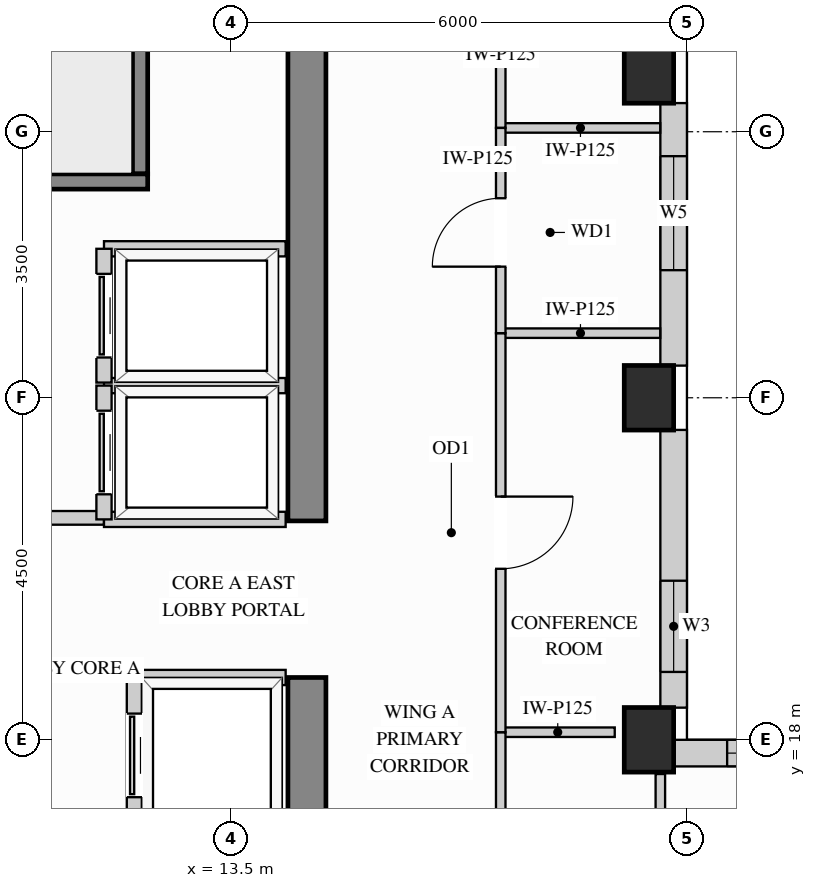
"""IFC4 building model, lengths in metres.
Left out: names, types, materials, properties, quantities, classifications, styles, units other than length and angle.
Written with IfcOpenShell. Run it as: python <this file> out.ifc"""

import sys

from ifc_helpers import new_model, si_unit, direction, frame, frame_2d, origin, origin_2d, place, context, subcontext, project, spatial, rectangle, extrude, source, transform, mapped, element, fill, save


model = new_model("IFC4")
c1 = context("Model", 3, precision=1e-05, world=origin(), true_north=direction((0.0, 1.0)))
c2 = subcontext(c1, "Body", "Model", "MODEL_VIEW")
j1 = project(units=[si_unit("LENGTHUNIT", "METRE"), si_unit("PLANEANGLEUNIT", "RADIAN")], contexts=[c1])
p1 = place(None, origin())
s1 = spatial("IfcSite", under=j1, at=p1, CompositionType="ELEMENT")
p2 = place(p1, origin())
s2 = spatial("IfcBuilding", under=s1, at=p2, CompositionType="ELEMENT")
p3 = place(p2, frame((0.0, 0.0, 216.0)))
s3 = spatial("IfcBuildingStorey", under=s2, at=p3, CompositionType="ELEMENT", Elevation=216.0)
m1 = source(origin(), c2, "Body", "SweptSolid", [
    extrude(rectangle(XDim=0.65, YDim=0.85, at=origin_2d()), origin(), (0.0, 0.0, 1.0), 3.4),
])
for number, where, z_axis, x_axis in (
    (1, (19.0, 18.0, 0.0), (0.0, 0.0, 1.0), (1.0, 0.0, 0.0)),
    (2, (19.0, 22.5, 0.0), (0.0, 0.0, 1.0), (1.0, 0.0, 0.0)),
    (3, (19.0, 26.8, 0.0), (0.0, 0.0, 1.0), (1.0, 0.0, 0.0)),
):
    element("IfcColumn", number, at=place(p3, frame(where, z_axis=z_axis, x_axis=x_axis)), inside=s3, PredefinedType="COLUMN", context=c2, shape_type="MappedRepresentation", body=[
        mapped(m1, transform((0.0, 0.0, 0.0), x_axis=(1.0, 0.0, 0.0), y_axis=(0.0, 1.0, 0.0), z_axis=(0.0, 0.0, 1.0))),
    ])
m2 = source(origin(), c2, "Body", "SweptSolid", [
    extrude(rectangle(XDim=10.07, YDim=0.5, at=frame_2d((5.035, 0.0))), origin(), (0.0, 0.0, 1.0), 3.4),
])
p4 = place(p3, frame((14.5, 8.75, 0.0), z_axis=(0.0, 0.0, 1.0), x_axis=(0.0, 1.0, 0.0)))
e4 = element("IfcWall", 4, at=p4, inside=s3, PredefinedType="SHEAR", context=c2, shape_type="MappedRepresentation", body=[
    mapped(m2, transform((0.0, 0.0, 0.0), x_axis=(1.0, 0.0, 0.0), y_axis=(0.0, 1.0, 0.0), z_axis=(0.0, 0.0, 1.0))),
])
m3 = source(origin(), c2, "Body", "SweptSolid", [
    extrude(rectangle(XDim=8.37, YDim=0.5, at=frame_2d((4.185, 0.0))), origin(), (0.0, 0.0, 1.0), 3.4),
])
p5 = place(p3, frame((14.5, 20.88, 0.0), z_axis=(0.0, 0.0, 1.0), x_axis=(0.0, 1.0, 0.0)))
e5 = element("IfcWall", 5, at=p5, inside=s3, PredefinedType="SHEAR", context=c2, shape_type="MappedRepresentation", body=[
    mapped(m3, transform((0.0, 0.0, 0.0), x_axis=(1.0, 0.0, 0.0), y_axis=(0.0, 1.0, 0.0), z_axis=(0.0, 0.0, 1.0))),
])
p6 = place(p3, frame((34.577, 17.825, 0.0), z_axis=(0.0, 0.0, 1.0), x_axis=(-1.0, 0.0, 0.0)))
e6 = element("IfcWall", 6, at=p6, inside=s3, PredefinedType="SOLIDWALL", context=c2, shape_type="SweptSolid", body=[
    extrude(rectangle(XDim=15.254, YDim=0.35, at=frame_2d((7.627, 0.0))), origin(), (0.0, 0.0, 1.0), 3.385),
])
p7 = place(p6, frame((0.706, 0.0, 0.78)))
e7 = element("IfcOpeningElement", 7, at=p7, cuts=e6, PredefinedType="OPENING", context=c2, shape_type="SweptSolid", body=[
    extrude(rectangle(XDim=1.5, YDim=2.0, at=frame_2d((0.75, 1.0))), frame((0.0, 0.185, 0.0), z_axis=(0.0, -1.0, 0.0), x_axis=(1.0, 0.0, 0.0)), (0.0, 0.0, 1.0), 0.37),
])
p8 = place(p6, frame((2.591, 0.0, 0.78)))
e8 = element("IfcOpeningElement", 8, at=p8, cuts=e6, PredefinedType="OPENING", context=c2, shape_type="SweptSolid", body=[
    extrude(rectangle(XDim=1.5, YDim=2.0, at=frame_2d((0.75, 1.0))), frame((0.0, 0.185, 0.0), z_axis=(0.0, -1.0, 0.0), x_axis=(1.0, 0.0, 0.0)), (0.0, 0.0, 1.0), 0.37),
])
p9 = place(p6, frame((5.744, 0.0, 0.78)))
e9 = element("IfcOpeningElement", 9, at=p9, cuts=e6, PredefinedType="OPENING", context=c2, shape_type="SweptSolid", body=[
    extrude(rectangle(XDim=1.5, YDim=2.0, at=frame_2d((0.75, 1.0))), frame((0.0, 0.185, 0.0), z_axis=(0.0, -1.0, 0.0), x_axis=(1.0, 0.0, 0.0)), (0.0, 0.0, 1.0), 0.37),
])
p10 = place(p6, frame((8.01, 0.0, 0.78)))
e10 = element("IfcOpeningElement", 10, at=p10, cuts=e6, PredefinedType="OPENING", context=c2, shape_type="SweptSolid", body=[
    extrude(rectangle(XDim=1.5, YDim=2.0, at=frame_2d((0.75, 1.0))), frame((0.0, 0.185, 0.0), z_axis=(0.0, -1.0, 0.0), x_axis=(1.0, 0.0, 0.0)), (0.0, 0.0, 1.0), 0.37),
])
p11 = place(p6, frame((11.163, 0.0, 0.78)))
e11 = element("IfcOpeningElement", 11, at=p11, cuts=e6, PredefinedType="OPENING", context=c2, shape_type="SweptSolid", body=[
    extrude(rectangle(XDim=1.5, YDim=2.0, at=frame_2d((0.75, 1.0))), frame((0.0, 0.185, 0.0), z_axis=(0.0, -1.0, 0.0), x_axis=(1.0, 0.0, 0.0)), (0.0, 0.0, 1.0), 0.37),
])
p12 = place(p6, frame((13.048, 0.0, 0.78)))
e12 = element("IfcOpeningElement", 12, at=p12, cuts=e6, PredefinedType="OPENING", context=c2, shape_type="SweptSolid", body=[
    extrude(rectangle(XDim=1.5, YDim=2.0, at=frame_2d((0.75, 1.0))), frame((0.0, 0.185, 0.0), z_axis=(0.0, -1.0, 0.0), x_axis=(1.0, 0.0, 0.0)), (0.0, 0.0, 1.0), 0.37),
])
p13 = place(p3, frame((19.325, 18.423, 0.0), z_axis=(0.0, 0.0, 1.0), x_axis=(0.0, 1.0, 0.0)))
e13 = element("IfcWall", 13, at=p13, inside=s3, PredefinedType="SOLIDWALL", context=c2, shape_type="SweptSolid", body=[
    extrude(rectangle(XDim=3.654, YDim=0.35, at=frame_2d((1.827, 0.0))), origin(), (0.0, 0.0, 1.0), 2.619),
])
p14 = place(p13, frame((0.47, 0.0, 0.78)))
e14 = element("IfcOpeningElement", 14, at=p14, cuts=e13, PredefinedType="OPENING", context=c2, shape_type="SweptSolid", body=[
    extrude(rectangle(XDim=1.2, YDim=1.659, at=frame_2d((0.6, 0.83))), frame((0.0, 0.185, 0.0), z_axis=(0.0, -1.0, 0.0), x_axis=(1.0, 0.0, 0.0)), (0.0, 0.0, 1.0), 0.37),
])
p15 = place(p3, frame((19.325, 22.923, 0.0), z_axis=(0.0, 0.0, 1.0), x_axis=(0.0, 1.0, 0.0)))
e15 = element("IfcWall", 15, at=p15, inside=s3, PredefinedType="SOLIDWALL", context=c2, shape_type="SweptSolid", body=[
    extrude(rectangle(XDim=3.454, YDim=0.35, at=frame_2d((1.727, 0.0))), origin(), (0.0, 0.0, 1.0), 2.619),
])
p16 = place(p15, frame((1.256, 0.0, 0.78)))
e16 = element("IfcOpeningElement", 16, at=p16, cuts=e15, PredefinedType="OPENING", context=c2, shape_type="SweptSolid", body=[
    extrude(rectangle(XDim=1.5, YDim=1.659, at=frame_2d((0.75, 0.83))), frame((0.0, 0.185, 0.0), z_axis=(0.0, -1.0, 0.0), x_axis=(1.0, 0.0, 0.0)), (0.0, 0.0, 1.0), 0.37),
])
p17 = place(p3, frame((7.15, 20.92, 0.0), z_axis=(0.0, 0.0, 1.0), x_axis=(1.0, 0.0, 0.0)))
e17 = element("IfcWall", 17, at=p17, inside=s3, PredefinedType="PARTITIONING", context=c2, shape_type="SweptSolid", body=[
    extrude(rectangle(XDim=4.68, YDim=0.18, at=frame_2d((2.34, 0.0))), origin(), (0.0, 0.0, 1.0), 3.385),
])
p18 = place(p17, frame((2.2, 0.0, 0.0)))
e18 = element("IfcOpeningElement", 18, at=p18, cuts=e17, PredefinedType="OPENING", context=c2, shape_type="SweptSolid", body=[
    extrude(rectangle(XDim=1.1, YDim=2.15, at=frame_2d((0.55, 1.075))), frame((0.0, 0.1, 0.0), z_axis=(0.0, -1.0, 0.0), x_axis=(1.0, 0.0, 0.0)), (0.0, 0.0, 1.0), 0.2),
])
m4 = source(origin(), c2, "Body", "SweptSolid", [
    extrude(rectangle(XDim=1.5, YDim=0.125, at=frame_2d((0.75, 0.0))), origin(), (0.0, 0.0, 1.0), 2.773),
])
p19 = place(p3, frame((17.05, 18.1, 0.0), z_axis=(0.0, 0.0, 1.0), x_axis=(1.0, 0.0, 0.0)))
e19 = element("IfcWall", 19, at=p19, inside=s3, PredefinedType="PARTITIONING", context=c2, shape_type="MappedRepresentation", body=[
    mapped(m4, transform((0.0, 0.0, 0.0), x_axis=(1.0, 0.0, 0.0), y_axis=(0.0, 1.0, 0.0), z_axis=(0.0, 0.0, 1.0))),
])
m5 = source(origin(), c2, "Body", "SweptSolid", [
    extrude(rectangle(XDim=2.098, YDim=0.125, at=frame_2d((1.049, 0.0))), origin(), (0.0, 0.0, 1.0), 3.385),
])
for number, where, z_axis, x_axis in (
    (20, (17.05, 23.35, 0.0), (0.0, 0.0, 1.0), (1.0, 0.0, 0.0)),
    (21, (17.05, 26.05, 0.0), (0.0, 0.0, 1.0), (1.0, 0.0, 0.0)),
):
    element("IfcWall", number, at=place(p3, frame(where, z_axis=z_axis, x_axis=x_axis)), inside=s3, PredefinedType="PARTITIONING", context=c2, shape_type="MappedRepresentation", body=[
        mapped(m5, transform((0.0, 0.0, 0.0), x_axis=(1.0, 0.0, 0.0), y_axis=(0.0, 1.0, 0.0), z_axis=(0.0, 0.0, 1.0))),
    ])
m6 = source(origin(), c2, "Body", "SweptSolid", [
    extrude(rectangle(XDim=3.6, YDim=0.125, at=frame_2d((1.8, 0.0))), origin(), (0.0, 0.0, 1.0), 2.773),
])
p20 = place(p3, frame((19.15, 13.95, 0.0), z_axis=(0.0, 0.0, 1.0), x_axis=(0.0, 1.0, 0.0)))
e22 = element("IfcWall", 22, at=p20, inside=s3, PredefinedType="PARTITIONING", context=c2, shape_type="MappedRepresentation", body=[
    mapped(m6, transform((0.0, 0.0, 0.0), x_axis=(1.0, 0.0, 0.0), y_axis=(0.0, 1.0, 0.0), z_axis=(0.0, 0.0, 1.0))),
])
p21 = place(p3, frame((17.05, 12.35, 0.0), z_axis=(0.0, 0.0, 1.0), x_axis=(0.0, 1.0, 0.0)))
e23 = element("IfcWall", 23, at=p21, inside=s3, PredefinedType="PARTITIONING", context=c2, shape_type="SweptSolid", body=[
    extrude(rectangle(XDim=5.75, YDim=0.125, at=frame_2d((2.875, 0.0))), origin(), (0.0, 0.0, 1.0), 3.385),
])
p22 = place(p21, frame((2.4, 0.0, 0.0)))
e24 = element("IfcOpeningElement", 24, at=p22, cuts=e23, PredefinedType="OPENING", context=c2, shape_type="SweptSolid", body=[
    extrude(rectangle(XDim=0.95, YDim=2.15, at=frame_2d((0.475, 1.075))), frame((0.0, 0.073, 0.0), z_axis=(0.0, -1.0, 0.0), x_axis=(1.0, 0.0, 0.0)), (0.0, 0.0, 1.0), 0.145),
])
p23 = place(p3, frame((17.05, 18.1, 0.0), z_axis=(0.0, 0.0, 1.0), x_axis=(0.0, 1.0, 0.0)))
e25 = element("IfcWall", 25, at=p23, inside=s3, PredefinedType="PARTITIONING", context=c2, shape_type="SweptSolid", body=[
    extrude(rectangle(XDim=5.25, YDim=0.125, at=frame_2d((2.625, 0.0))), origin(), (0.0, 0.0, 1.0), 3.385),
])
p24 = place(p23, frame((2.15, 0.0, 0.0)))
e26 = element("IfcOpeningElement", 26, at=p24, cuts=e25, PredefinedType="OPENING", context=c2, shape_type="SweptSolid", body=[
    extrude(rectangle(XDim=0.95, YDim=2.15, at=frame_2d((0.475, 1.075))), frame((0.0, 0.073, 0.0), z_axis=(0.0, -1.0, 0.0), x_axis=(1.0, 0.0, 0.0)), (0.0, 0.0, 1.0), 0.145),
])
p25 = place(p3, frame((17.05, 26.05, 0.0), z_axis=(0.0, 0.0, 1.0), x_axis=(0.0, 1.0, 0.0)))
e27 = element("IfcWall", 27, at=p25, inside=s3, PredefinedType="PARTITIONING", context=c2, shape_type="SweptSolid", body=[
    extrude(rectangle(XDim=6.2, YDim=0.125, at=frame_2d((3.1, 0.0))), origin(), (0.0, 0.0, 1.0), 3.385),
])
p26 = place(p25, frame((2.625, 0.0, 0.0)))
e28 = element("IfcOpeningElement", 28, at=p26, cuts=e27, PredefinedType="OPENING", context=c2, shape_type="SweptSolid", body=[
    extrude(rectangle(XDim=0.95, YDim=2.15, at=frame_2d((0.475, 1.075))), frame((0.0, 0.073, 0.0), z_axis=(0.0, -1.0, 0.0), x_axis=(1.0, 0.0, 0.0)), (0.0, 0.0, 1.0), 0.145),
])
p27 = place(p3, frame((17.05, 23.35, 0.0), z_axis=(0.0, 0.0, 1.0), x_axis=(0.0, 1.0, 0.0)))
e29 = element("IfcWall", 29, at=p27, inside=s3, PredefinedType="PARTITIONING", context=c2, shape_type="SweptSolid", body=[
    extrude(rectangle(XDim=2.7, YDim=0.125, at=frame_2d((1.35, 0.0))), origin(), (0.0, 0.0, 1.0), 3.385),
])
p28 = place(p27, frame((0.875, 0.0, 0.0)))
e30 = element("IfcOpeningElement", 30, at=p28, cuts=e29, PredefinedType="OPENING", context=c2, shape_type="SweptSolid", body=[
    extrude(rectangle(XDim=0.9, YDim=2.15, at=frame_2d((0.45, 1.075))), frame((0.0, 0.073, 0.0), z_axis=(0.0, -1.0, 0.0), x_axis=(1.0, 0.0, 0.0)), (0.0, 0.0, 1.0), 0.145),
])
m7 = source(origin(), c2, "Body", "SweptSolid", [
    extrude(rectangle(XDim=2.39, YDim=0.2, at=frame_2d((1.195, 0.0))), origin(), (0.0, 0.0, 1.0), 3.385),
])
for number, where, z_axis, x_axis in (
    (31, (11.83, 22.66, 0.0), (0.0, 0.0, 1.0), (1.0, 0.0, 0.0)),
    (32, (11.83, 20.9, 0.0), (0.0, 0.0, 1.0), (1.0, 0.0, 0.0)),
):
    element("IfcWall", number, at=place(p3, frame(where, z_axis=z_axis, x_axis=x_axis)), inside=s3, PredefinedType="PARTITIONING", context=c2, shape_type="MappedRepresentation", body=[
        mapped(m7, transform((0.0, 0.0, 0.0), x_axis=(1.0, 0.0, 0.0), y_axis=(0.0, 1.0, 0.0), z_axis=(0.0, 0.0, 1.0))),
    ])
p29 = place(p3, frame((11.83, 20.9, 0.0), z_axis=(0.0, 0.0, 1.0), x_axis=(0.0, 1.0, 0.0)))
e33 = element("IfcWall", 33, at=p29, inside=s3, PredefinedType="PARTITIONING", context=c2, shape_type="SweptSolid", body=[
    extrude(rectangle(XDim=1.76, YDim=0.2, at=frame_2d((0.88, 0.0))), origin(), (0.0, 0.0, 1.0), 3.385),
])
p30 = place(p29, frame((0.33, 0.0, 0.0)))
e34 = element("IfcOpeningElement", 34, at=p30, cuts=e33, PredefinedType="OPENING", context=c2, shape_type="SweptSolid", body=[
    extrude(rectangle(XDim=1.1, YDim=2.2, at=frame_2d((0.55, 1.1))), frame((0.0, 0.11, 0.0), z_axis=(0.0, -1.0, 0.0), x_axis=(1.0, 0.0, 0.0)), (0.0, 0.0, 1.0), 0.22),
])
p31 = place(p3, frame((11.83, 24.46, 0.0), z_axis=(0.0, 0.0, 1.0), x_axis=(1.0, 0.0, 0.0)))
e35 = element("IfcWall", 35, at=p31, inside=s3, PredefinedType="PARTITIONING", context=c2, shape_type="MappedRepresentation", body=[
    mapped(m7, transform((0.0, 0.0, 0.0), x_axis=(1.0, 0.0, 0.0), y_axis=(0.0, 1.0, 0.0), z_axis=(0.0, 0.0, 1.0))),
])
p32 = place(p3, frame((11.83, 22.7, 0.0), z_axis=(0.0, 0.0, 1.0), x_axis=(0.0, 1.0, 0.0)))
e36 = element("IfcWall", 36, at=p32, inside=s3, PredefinedType="PARTITIONING", context=c2, shape_type="SweptSolid", body=[
    extrude(rectangle(XDim=1.76, YDim=0.2, at=frame_2d((0.88, 0.0))), origin(), (0.0, 0.0, 1.0), 3.385),
])
p33 = place(p32, frame((0.33, 0.0, 0.0)))
e37 = element("IfcOpeningElement", 37, at=p33, cuts=e36, PredefinedType="OPENING", context=c2, shape_type="SweptSolid", body=[
    extrude(rectangle(XDim=1.1, YDim=2.2, at=frame_2d((0.55, 1.1))), frame((0.0, 0.11, 0.0), z_axis=(0.0, -1.0, 0.0), x_axis=(1.0, 0.0, 0.0)), (0.0, 0.0, 1.0), 0.22),
])
m8 = source(origin(), c2, "Body", "SweptSolid", [
    extrude(rectangle(XDim=1.99, YDim=0.2, at=frame_2d((0.995, 0.0))), origin(), (0.0, 0.0, 1.0), 3.385),
])
p34 = place(p3, frame((12.23, 18.82, 0.0), z_axis=(0.0, 0.0, 1.0), x_axis=(1.0, 0.0, 0.0)))
e38 = element("IfcWall", 38, at=p34, inside=s3, PredefinedType="PARTITIONING", context=c2, shape_type="MappedRepresentation", body=[
    mapped(m8, transform((0.0, 0.0, 0.0), x_axis=(1.0, 0.0, 0.0), y_axis=(0.0, 1.0, 0.0), z_axis=(0.0, 0.0, 1.0))),
])
p35 = place(p3, frame((12.23, 16.77, 0.0), z_axis=(0.0, 0.0, 1.0), x_axis=(0.0, 1.0, 0.0)))
e39 = element("IfcWall", 39, at=p35, inside=s3, PredefinedType="PARTITIONING", context=c2, shape_type="SweptSolid", body=[
    extrude(rectangle(XDim=2.05, YDim=0.2, at=frame_2d((1.025, 0.0))), origin(), (0.0, 0.0, 1.0), 3.385),
])
p36 = place(p35, frame((0.475, 0.0, 0.0)))
e40 = element("IfcOpeningElement", 40, at=p36, cuts=e39, PredefinedType="OPENING", context=c2, shape_type="SweptSolid", body=[
    extrude(rectangle(XDim=1.1, YDim=2.2, at=frame_2d((0.55, 1.1))), frame((0.0, 0.11, 0.0), z_axis=(0.0, -1.0, 0.0), x_axis=(1.0, 0.0, 0.0)), (0.0, 0.0, 1.0), 0.22),
])
m9 = source(origin(), c2, "Body", "SweptSolid", [
    extrude(rectangle(XDim=3.803, YDim=0.2, at=frame_2d((1.901, 0.0))), origin(), (0.0, 0.0, 1.0), 3.4),
])
p37 = place(p3, frame((12.305, 25.445, 0.0), z_axis=(0.0, 0.0, 1.0), x_axis=(0.0, 1.0, 0.0)))
e41 = element("IfcWall", 41, at=p37, inside=s3, PredefinedType="SHEAR", context=c2, shape_type="MappedRepresentation", body=[
    mapped(m9, transform((0.0, 0.0, 0.0), x_axis=(1.0, 0.0, 0.0), y_axis=(0.0, 1.0, 0.0), z_axis=(0.0, 0.0, 1.0))),
])
p38 = place(p3, frame((4.752, 25.345, 0.0), z_axis=(0.0, 0.0, 1.0), x_axis=(1.0, 0.0, 0.0)))
e42 = element("IfcWall", 42, at=p38, inside=s3, PredefinedType="SHEAR", context=c2, shape_type="SweptSolid", body=[
    extrude(rectangle(XDim=7.653, YDim=0.2, at=frame_2d((3.827, 0.0))), origin(), (0.0, 0.0, 1.0), 3.4),
])
p39 = place(p38, frame((0.4, 0.0, 0.0)))
e43 = element("IfcOpeningElement", 43, at=p39, cuts=e42, PredefinedType="OPENING", context=c2, shape_type="SweptSolid", body=[
    extrude(rectangle(XDim=1.1, YDim=2.15, at=frame_2d((0.55, 1.075))), frame((0.0, 0.11, 0.0), z_axis=(0.0, -1.0, 0.0), x_axis=(1.0, 0.0, 0.0)), (0.0, 0.0, 1.0), 0.22),
])
m10 = source(origin(), c2, "Body", "SweptSolid", [
    extrude(rectangle(XDim=1.1, YDim=2.2, at=frame_2d((0.55, 1.1))), frame((0.0, 0.025, 0.0), z_axis=(0.0, -1.0, 0.0), x_axis=(1.0, 0.0, 0.0)), (0.0, 0.0, 1.0), 0.05),
])
p40 = place(p30, origin())
e44 = element("IfcDoor", 44, at=p40, inside=s3, OperationType="SLIDING_TO_LEFT", PredefinedType="DOOR", context=c2, shape_type="MappedRepresentation", body=[
    mapped(m10, transform((0.0, 0.0, 0.0), x_axis=(1.0, 0.0, 0.0), y_axis=(0.0, 1.0, 0.0), z_axis=(0.0, 0.0, 1.0))),
])
fill(e34, e44)
p41 = place(p33, origin())
e45 = element("IfcDoor", 45, at=p41, inside=s3, OperationType="SLIDING_TO_LEFT", PredefinedType="DOOR", context=c2, shape_type="MappedRepresentation", body=[
    mapped(m10, transform((0.0, 0.0, 0.0), x_axis=(1.0, 0.0, 0.0), y_axis=(0.0, 1.0, 0.0), z_axis=(0.0, 0.0, 1.0))),
])
fill(e37, e45)
p42 = place(p36, origin())
e46 = element("IfcDoor", 46, at=p42, inside=s3, OperationType="SLIDING_TO_LEFT", PredefinedType="DOOR", context=c2, shape_type="MappedRepresentation", body=[
    mapped(m10, transform((0.0, 0.0, 0.0), x_axis=(1.0, 0.0, 0.0), y_axis=(0.0, 1.0, 0.0), z_axis=(0.0, 0.0, 1.0))),
])
fill(e40, e46)
m11 = source(origin(), c2, "Body", "SweptSolid", [
    extrude(rectangle(XDim=0.95, YDim=2.15, at=frame_2d((0.475, 1.075))), frame((0.0, 0.025, 0.0), z_axis=(0.0, -1.0, 0.0), x_axis=(1.0, 0.0, 0.0)), (0.0, 0.0, 1.0), 0.05),
])
p43 = place(p24, origin())
e47 = element("IfcDoor", 47, at=p43, inside=s3, OperationType="SINGLE_SWING_RIGHT", PredefinedType="DOOR", context=c2, shape_type="MappedRepresentation", body=[
    mapped(m11, transform((0.0, 0.0, 0.0), x_axis=(1.0, 0.0, 0.0), y_axis=(0.0, 1.0, 0.0), z_axis=(0.0, 0.0, 1.0))),
])
fill(e26, e47)
m12 = source(origin(), c2, "Body", "SweptSolid", [
    extrude(rectangle(XDim=0.9, YDim=2.15, at=frame_2d((0.45, 1.075))), frame((0.0, 0.025, 0.0), z_axis=(0.0, -1.0, 0.0), x_axis=(1.0, 0.0, 0.0)), (0.0, 0.0, 1.0), 0.05),
])
p44 = place(p28, origin())
e48 = element("IfcDoor", 48, at=p44, inside=s3, OperationType="SINGLE_SWING_LEFT", PredefinedType="DOOR", context=c2, shape_type="MappedRepresentation", body=[
    mapped(m12, transform((0.0, 0.0, 0.0), x_axis=(1.0, 0.0, 0.0), y_axis=(0.0, 1.0, 0.0), z_axis=(0.0, 0.0, 1.0))),
])
fill(e30, e48)
m13 = source(origin(), c2, "Body", "SweptSolid", [
    extrude(rectangle(XDim=1.2, YDim=1.659, at=frame_2d((0.6, 0.83))), frame((0.0, 0.03, 0.0), z_axis=(0.0, -1.0, 0.0), x_axis=(1.0, 0.0, 0.0)), (0.0, 0.0, 1.0), 0.06),
])
p45 = place(p14, origin())
e49 = element("IfcWindow", 49, at=p45, inside=s3, PartitioningType="SINGLE_PANEL", PredefinedType="WINDOW", context=c2, shape_type="MappedRepresentation", body=[
    mapped(m13, transform((0.0, 0.0, 0.0), x_axis=(1.0, 0.0, 0.0), y_axis=(0.0, 1.0, 0.0), z_axis=(0.0, 0.0, 1.0))),
])
fill(e14, e49)
m14 = source(origin(), c2, "Body", "SweptSolid", [
    extrude(rectangle(XDim=1.5, YDim=2.0, at=frame_2d((0.75, 1.0))), frame((0.0, 0.03, 0.0), z_axis=(0.0, -1.0, 0.0), x_axis=(1.0, 0.0, 0.0)), (0.0, 0.0, 1.0), 0.06),
])
p46 = place(p12, origin())
e50 = element("IfcWindow", 50, at=p46, inside=s3, PartitioningType="SINGLE_PANEL", PredefinedType="WINDOW", context=c2, shape_type="MappedRepresentation", body=[
    mapped(m14, transform((0.0, 0.0, 0.0), x_axis=(1.0, 0.0, 0.0), y_axis=(0.0, 1.0, 0.0), z_axis=(0.0, 0.0, 1.0))),
])
fill(e12, e50)
m15 = source(origin(), c2, "Body", "SweptSolid", [
    extrude(rectangle(XDim=1.5, YDim=1.659, at=frame_2d((0.75, 0.83))), frame((0.0, 0.03, 0.0), z_axis=(0.0, -1.0, 0.0), x_axis=(1.0, 0.0, 0.0)), (0.0, 0.0, 1.0), 0.06),
])
p47 = place(p16, origin())
e51 = element("IfcWindow", 51, at=p47, inside=s3, PartitioningType="SINGLE_PANEL", PredefinedType="WINDOW", context=c2, shape_type="MappedRepresentation", body=[
    mapped(m15, transform((0.0, 0.0, 0.0), x_axis=(1.0, 0.0, 0.0), y_axis=(0.0, 1.0, 0.0), z_axis=(0.0, 0.0, 1.0))),
])
fill(e16, e51)
save(model, sys.argv[1])
